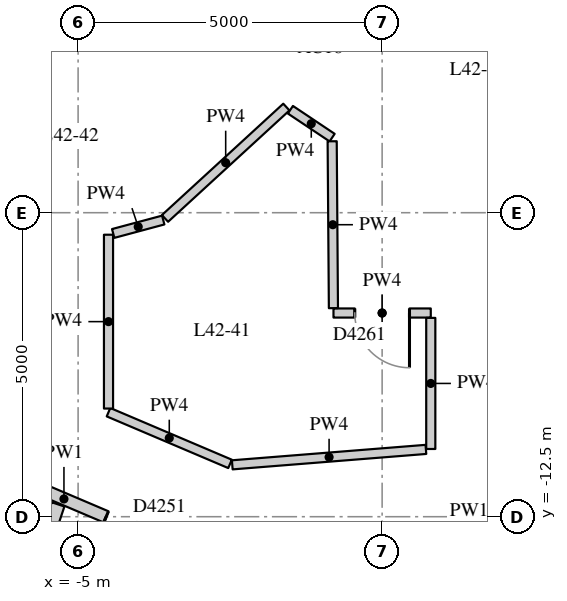
"""IFC4 building model, lengths in metres.
Left out: names, types, materials, properties, quantities, classifications, styles, units other than length and angle.
Written with IfcOpenShell. Run it as: python <this file> out.ifc"""

import sys

from ifc_helpers import new_model, si_unit, direction, frame, frame_2d, origin, place, context, subcontext, project, spatial, rectangle, extrude, element, fill, save


model = new_model("IFC4")
c1 = context("Model", 3, precision=1e-05, world=origin(), true_north=direction((0.0, 1.0)))
c2 = subcontext(c1, "Body", "Model", "MODEL_VIEW")
j1 = project(units=[si_unit("LENGTHUNIT", "METRE"), si_unit("PLANEANGLEUNIT", "RADIAN")], contexts=[c1])
p1 = place(None, origin())
s1 = spatial("IfcSite", under=j1, at=p1, CompositionType="ELEMENT")
p2 = place(p1, origin())
s2 = spatial("IfcBuilding", under=s1, at=p2, CompositionType="ELEMENT")
p3 = place(p2, frame((0.0, 0.0, 151.7)))
s3 = spatial("IfcBuildingStorey", under=s2, at=p3, CompositionType="ELEMENT", Elevation=151.7)
p4 = place(p3, frame((5.593, -12.609, 0.0), z_axis=(0.0, 0.0, 1.0), x_axis=(-0.99682930336, -0.079569717626, 0.0)))
e1 = element("IfcWall", 1, at=p4, inside=s3, PredefinedType="PARTITIONING", context=c2, shape_type="SweptSolid", body=[
    extrude(rectangle(XDim=8.349, YDim=0.2, at=frame_2d((4.174, 0.0))), origin(), (0.0, 0.0, 1.0), 3.02),
])
p5 = place(p4, frame((1.232, 0.0, 0.0)))
e2 = element("IfcOpeningElement", 2, at=p5, cuts=e1, PredefinedType="OPENING", context=c2, shape_type="SweptSolid", body=[
    extrude(rectangle(XDim=1.1, YDim=2.1, at=frame_2d((0.55, 1.05))), frame((0.0, 0.11, 0.0), z_axis=(0.0, -1.0, 0.0), x_axis=(1.0, 0.0, 0.0)), (0.0, 0.0, 1.0), 0.22),
])
p6 = place(p3, frame((-2.766, -13.258, 0.0), z_axis=(0.0, 0.0, 1.0), x_axis=(-0.920210819037, 0.391423106787, 0.0)))
e3 = element("IfcWall", 3, at=p6, inside=s3, PredefinedType="PARTITIONING", context=c2, shape_type="SweptSolid", body=[
    extrude(rectangle(XDim=5.362, YDim=0.2, at=frame_2d((2.681, 0.0))), origin(), (0.0, 0.0, 1.0), 3.02),
])
p7 = place(p6, frame((3.495, 0.0, 0.0)))
e4 = element("IfcOpeningElement", 4, at=p7, cuts=e3, PredefinedType="OPENING", context=c2, shape_type="SweptSolid", body=[
    extrude(rectangle(XDim=0.9, YDim=2.1, at=frame_2d((0.45, 1.05))), frame((0.0, 0.11, 0.0), z_axis=(0.0, -1.0, 0.0), x_axis=(1.0, 0.0, 0.0)), (0.0, 0.0, 1.0), 0.22),
])
p8 = place(p6, frame((0.827, 0.0, 0.0)))
e5 = element("IfcOpeningElement", 5, at=p8, cuts=e3, PredefinedType="OPENING", context=c2, shape_type="SweptSolid", body=[
    extrude(rectangle(XDim=1.1, YDim=2.1, at=frame_2d((0.55, 1.05))), frame((0.0, 0.11, 0.0), z_axis=(0.0, -1.0, 0.0), x_axis=(1.0, 0.0, 0.0)), (0.0, 0.0, 1.0), 0.22),
])
p9 = place(p3, frame((-0.8, -9.15, 0.0), z_axis=(0.0, 0.0, 1.0), x_axis=(1.0, 0.0, 0.0)))
e6 = element("IfcWall", 6, at=p9, inside=s3, PredefinedType="PARTITIONING", context=c2, shape_type="SweptSolid", body=[
    extrude(rectangle(XDim=1.6, YDim=0.15, at=frame_2d((0.8, 0.0))), origin(), (0.0, 0.0, 1.0), 3.02),
])
p10 = place(p9, frame((0.35, 0.0, 0.0)))
e7 = element("IfcOpeningElement", 7, at=p10, cuts=e6, PredefinedType="OPENING", context=c2, shape_type="SweptSolid", body=[
    extrude(rectangle(XDim=0.9, YDim=2.1, at=frame_2d((0.45, 1.05))), frame((0.0, 0.085, 0.0), z_axis=(0.0, -1.0, 0.0), x_axis=(1.0, 0.0, 0.0)), (0.0, 0.0, 1.0), 0.17),
])
p11 = place(p3, frame((0.8, -9.23, 0.0), z_axis=(0.0, 0.0, 1.0), x_axis=(0.0, -1.0, 0.0)))
e8 = element("IfcWall", 8, at=p11, inside=s3, PredefinedType="PARTITIONING", context=c2, shape_type="SweptSolid", body=[
    extrude(rectangle(XDim=2.156, YDim=0.15, at=frame_2d((1.078, 0.0))), origin(), (0.0, 0.0, 1.0), 3.02),
])
p12 = place(p3, frame((0.72, -11.393, 0.0), z_axis=(0.0, 0.0, 1.0), x_axis=(-0.996836626024, -0.079477927865, 0.0)))
e9 = element("IfcWall", 9, at=p12, inside=s3, PredefinedType="PARTITIONING", context=c2, shape_type="SweptSolid", body=[
    extrude(rectangle(XDim=3.195, YDim=0.15, at=frame_2d((1.597, 0.0))), origin(), (0.0, 0.0, 1.0), 3.02),
])
p13 = place(p3, frame((-2.501, -11.631, 0.0), z_axis=(0.0, 0.0, 1.0), x_axis=(-0.920228720371, 0.391381019217, 0.0)))
e10 = element("IfcWall", 10, at=p13, inside=s3, PredefinedType="PARTITIONING", context=c2, shape_type="SweptSolid", body=[
    extrude(rectangle(XDim=2.172, YDim=0.15, at=frame_2d((1.086, 0.0))), origin(), (0.0, 0.0, 1.0), 3.02),
])
p14 = place(p3, frame((-4.5, -10.721, 0.0), z_axis=(0.0, 0.0, 1.0), x_axis=(0.0, 1.0, 0.0)))
e11 = element("IfcWall", 11, at=p14, inside=s3, PredefinedType="PARTITIONING", context=c2, shape_type="SweptSolid", body=[
    extrude(rectangle(XDim=2.859, YDim=0.15, at=frame_2d((1.43, 0.0))), origin(), (0.0, 0.0, 1.0), 3.02),
])
p15 = place(p3, frame((-4.423, -7.842, 0.0), z_axis=(0.0, 0.0, 1.0), x_axis=(0.965853333569, 0.259089440221, 0.0)))
e12 = element("IfcWall", 12, at=p15, inside=s3, PredefinedType="PARTITIONING", context=c2, shape_type="SweptSolid", body=[
    extrude(rectangle(XDim=0.852, YDim=0.15, at=frame_2d((0.426, 0.0))), origin(), (0.0, 0.0, 1.0), 3.02),
])
p16 = place(p3, frame((-3.571, -7.594, 0.0), z_axis=(0.0, 0.0, 1.0), x_axis=(0.736783660812, 0.676128565555, 0.0)))
e13 = element("IfcWall", 13, at=p16, inside=s3, PredefinedType="PARTITIONING", context=c2, shape_type="SweptSolid", body=[
    extrude(rectangle(XDim=2.709, YDim=0.15, at=frame_2d((1.354, 0.0))), origin(), (0.0, 0.0, 1.0), 3.02),
])
p17 = place(p3, frame((-1.509, -5.806, 0.0), z_axis=(0.0, 0.0, 1.0), x_axis=(0.831367153095, -0.55572354346, 0.0)))
e14 = element("IfcWall", 14, at=p17, inside=s3, PredefinedType="PARTITIONING", context=c2, shape_type="SweptSolid", body=[
    extrude(rectangle(XDim=0.825, YDim=0.15, at=frame_2d((0.413, 0.0))), origin(), (0.0, 0.0, 1.0), 3.02),
])
p18 = place(p3, frame((-0.822, -6.325, 0.0), z_axis=(0.0, 0.0, 1.0), x_axis=(0.007471771501, -0.999972085926, 0.0)))
e15 = element("IfcWall", 15, at=p18, inside=s3, PredefinedType="PARTITIONING", context=c2, shape_type="SweptSolid", body=[
    extrude(rectangle(XDim=2.745, YDim=0.15, at=frame_2d((1.372, 0.0))), origin(), (0.0, 0.0, 1.0), 3.02),
])
p19 = place(p3, frame((-7.683, -19.345, 0.0), z_axis=(0.0, 0.0, 1.0), x_axis=(0.316720596973, 0.948518878807, 0.0)))
e16 = element("IfcWall", 16, at=p19, inside=s3, PredefinedType="PARTITIONING", context=c2, shape_type="SweptSolid", body=[
    extrude(rectangle(XDim=7.43, YDim=0.22, at=frame_2d((3.715, 0.0))), origin(), (0.0, 0.0, 1.0), 3.02),
])
p20 = place(p3, frame((-4.073, -3.927, 0.0), z_axis=(0.0, 0.0, 1.0), x_axis=(-0.923860025149, -0.382730523909, 0.0)))
e17 = element("IfcWall", 17, at=p20, inside=s3, PredefinedType="PARTITIONING", context=c2, shape_type="SweptSolid", body=[
    extrude(rectangle(XDim=4.251, YDim=0.1, at=frame_2d((2.125, 0.0))), origin(), (0.0, 0.0, 1.0), 3.02),
])
p21 = place(p8, origin())
e18 = element("IfcDoor", 18, at=p21, inside=s3, OperationType="SINGLE_SWING_RIGHT", PredefinedType="DOOR", context=c2, shape_type="SweptSolid", body=[
    extrude(rectangle(XDim=1.1, YDim=2.1, at=frame_2d((0.55, 1.05))), frame((0.0, 0.025, 0.0), z_axis=(0.0, -1.0, 0.0), x_axis=(1.0, 0.0, 0.0)), (0.0, 0.0, 1.0), 0.05),
])
fill(e5, e18)
p22 = place(p10, origin())
e19 = element("IfcDoor", 19, at=p22, inside=s3, OperationType="SINGLE_SWING_LEFT", PredefinedType="DOOR", context=c2, shape_type="SweptSolid", body=[
    extrude(rectangle(XDim=0.9, YDim=2.1, at=frame_2d((0.45, 1.05))), frame((0.0, 0.025, 0.0), z_axis=(0.0, -1.0, 0.0), x_axis=(1.0, 0.0, 0.0)), (0.0, 0.0, 1.0), 0.05),
])
fill(e7, e19)
save(model, sys.argv[1])
